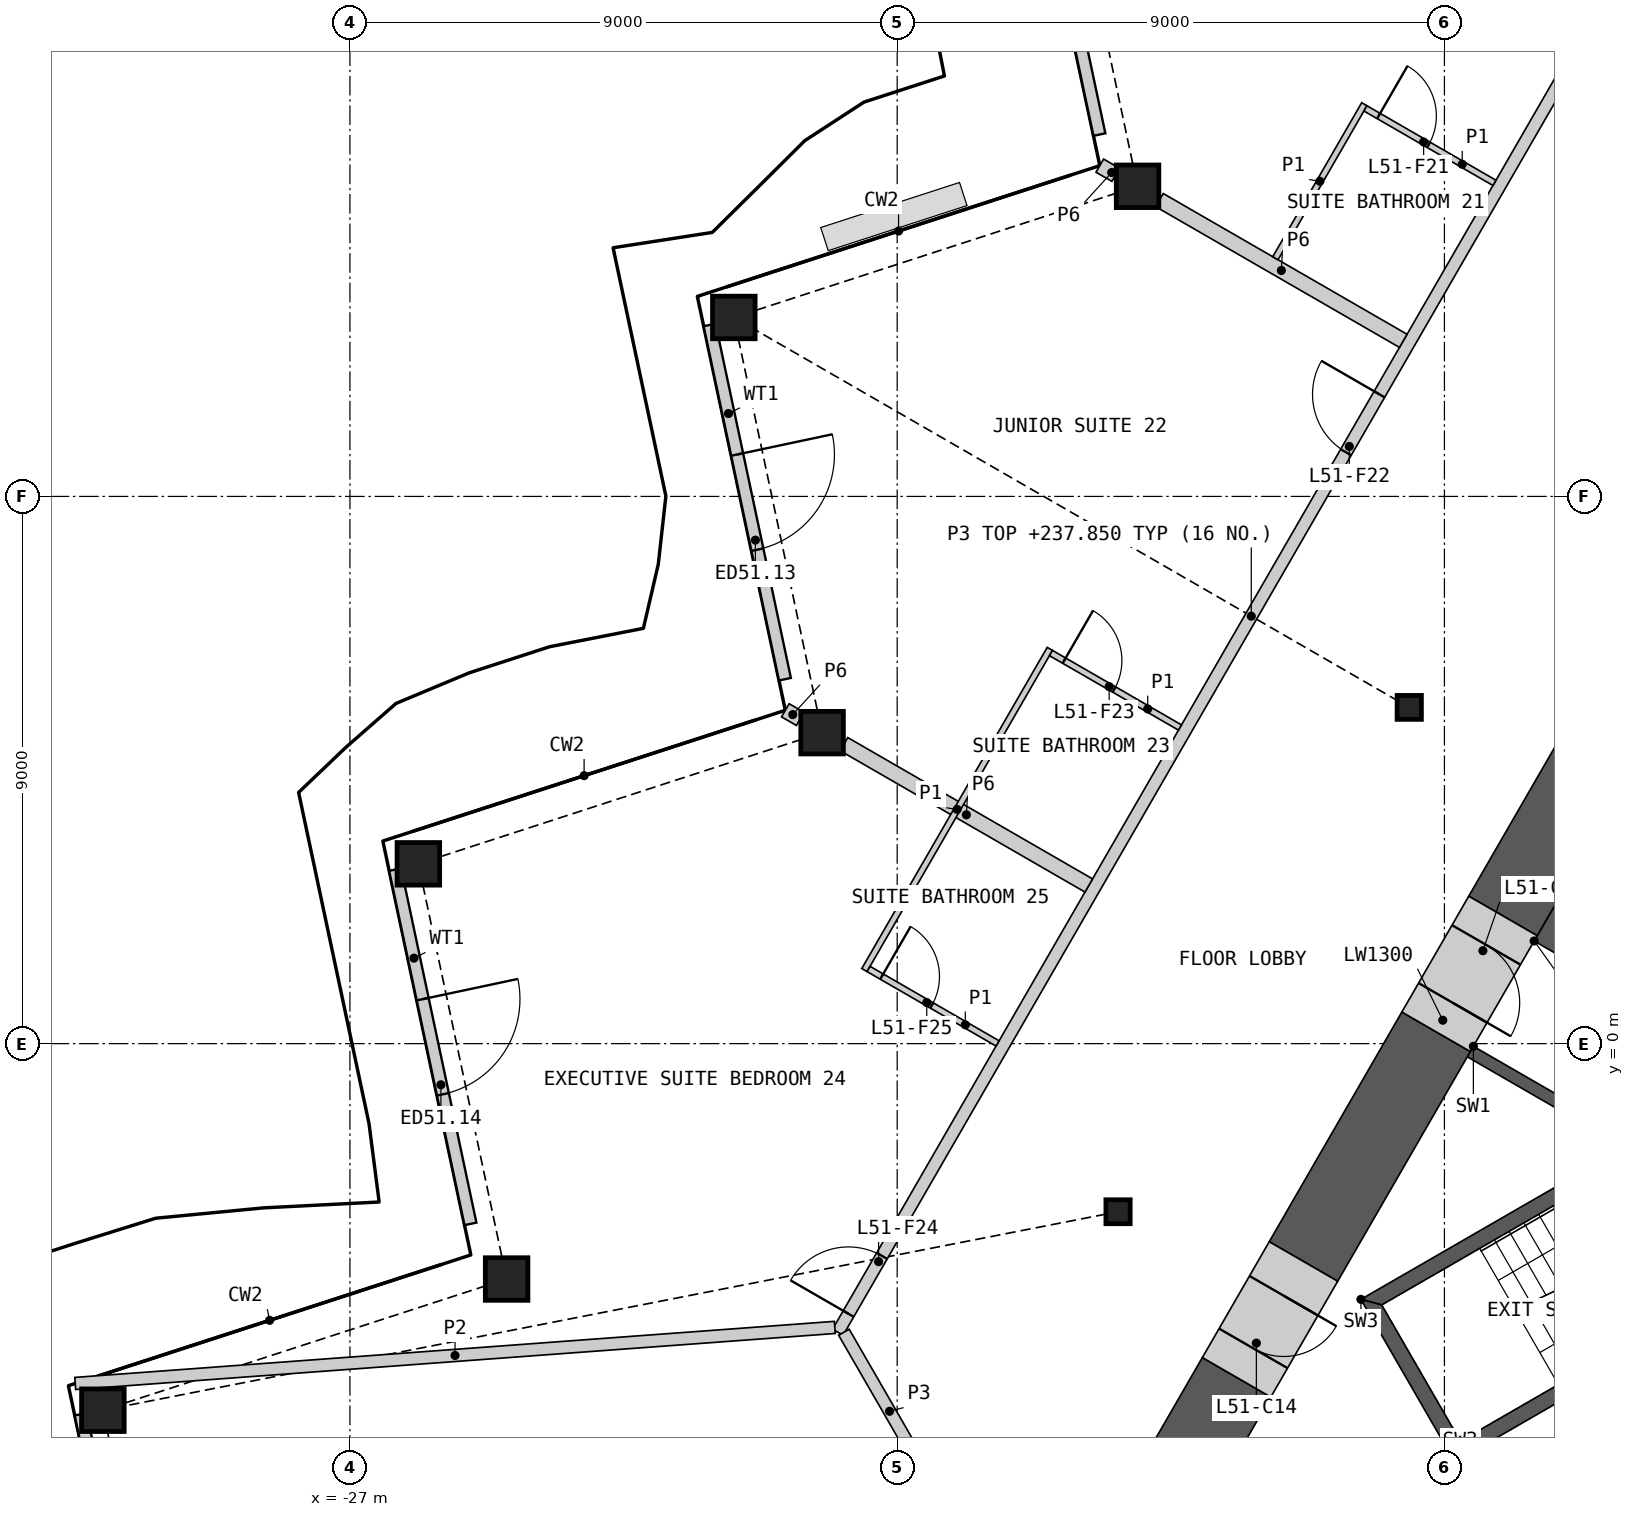
"""IFC4 building model, lengths in metres.
Left out: names, types, materials, properties, quantities, classifications, styles, units other than length and angle.
Written with IfcOpenShell. Run it as: python <this file> out.ifc"""

import sys

from ifc_helpers import new_model, si_unit, direction, frame, frame_2d, origin, origin_2d, place, context, subcontext, project, spatial, polyline, rectangle, hollow_rectangle, i_section, outline, extrude, element, fill, save


model = new_model("IFC4")
c1 = context("Model", 3, precision=1e-05, world=origin(), true_north=direction((0.0, 1.0)))
c2 = subcontext(c1, "Body", "Model", "MODEL_VIEW")
j1 = project(units=[si_unit("LENGTHUNIT", "METRE"), si_unit("PLANEANGLEUNIT", "RADIAN")], contexts=[c1])
p1 = place(None, origin())
s1 = spatial("IfcSite", under=j1, at=p1, CompositionType="ELEMENT")
p2 = place(p1, origin())
s2 = spatial("IfcBuilding", under=s1, at=p2, CompositionType="ELEMENT")
p3 = place(p2, frame((0.0, 0.0, 234.6)))
s3 = spatial("IfcBuildingStorey", under=s2, at=p3, CompositionType="ELEMENT", Elevation=234.6)
for number, where, z_axis, x_axis in (
    (1, (-14.047, 14.101, 0.0), (0.0, 0.0, 1.0), (1.0, 0.0, 0.0)),
    (2, (-20.687, 11.943, 0.0), (0.0, 0.0, 1.0), (1.0, 0.0, 0.0)),
    (3, (-19.235, 5.115, 0.0), (0.0, 0.0, 1.0), (1.0, 0.0, 0.0)),
    (4, (-25.875, 2.957, 0.0), (0.0, 0.0, 1.0), (1.0, 0.0, 0.0)),
    (5, (-24.423, -3.872, 0.0), (0.0, 0.0, 1.0), (1.0, 0.0, 0.0)),
    (6, (-31.063, -6.029, 0.0), (0.0, 0.0, 1.0), (1.0, 0.0, 0.0)),
):
    element("IfcColumn", number, at=place(p3, frame(where, z_axis=z_axis, x_axis=x_axis)), inside=s3, PredefinedType="COLUMN", context=c2, shape_type="SweptSolid", body=[
        extrude(hollow_rectangle(XDim=0.7, YDim=0.7, WallThickness=0.045, at=origin_2d()), origin(), (0.0, 0.0, 1.0), 3.6),
    ])
for number, where, z_axis, x_axis in (
    (7, (-9.578, 5.53, 0.0), (0.0, 0.0, 1.0), (1.0, 0.0, 0.0)),
    (8, (-14.368, -2.765, 0.0), (0.0, 0.0, 1.0), (1.0, 0.0, 0.0)),
):
    element("IfcColumn", number, at=place(p3, frame(where, z_axis=z_axis, x_axis=x_axis)), inside=s3, PredefinedType="COLUMN", context=c2, shape_type="SweptSolid", body=[
        extrude(i_section(OverallWidth=0.399, OverallDepth=0.393, WebThickness=0.023, FlangeThickness=0.037, at=origin_2d()), origin(), (0.0, 0.0, 1.0), 3.6),
    ])
p4 = place(p3, frame((-15.913, 20.779, 0.0), z_axis=(0.0, 0.0, 1.0), x_axis=(0.207930802022, -0.978143538327, 0.0)))
e9 = element("IfcWall", 9, at=p4, inside=s3, PredefinedType="SOLIDWALL", context=c2, shape_type="SweptSolid", body=[
    extrude(rectangle(XDim=5.958, YDim=0.2, at=frame_2d((2.979, 0.0))), origin(), (0.0, 0.0, 1.0), 2.701),
])
p5 = place(p4, frame((2.179, 0.0, 0.0)))
e10 = element("IfcOpeningElement", 10, at=p5, cuts=e9, PredefinedType="OPENING", context=c2, shape_type="SweptSolid", body=[
    extrude(rectangle(XDim=1.6, YDim=2.4, at=frame_2d((0.8, 1.2))), frame((0.0, 0.11, 0.0), z_axis=(0.0, -1.0, 0.0), x_axis=(1.0, 0.0, 0.0)), (0.0, 0.0, 1.0), 0.22),
])
p6 = place(p3, frame((-21.085, 11.821, 0.0), z_axis=(0.0, 0.0, 1.0), x_axis=(0.207930802022, -0.978143538327, 0.0)))
e11 = element("IfcWall", 11, at=p6, inside=s3, PredefinedType="SOLIDWALL", context=c2, shape_type="SweptSolid", body=[
    extrude(rectangle(XDim=5.958, YDim=0.2, at=frame_2d((2.979, 0.0))), origin(), (0.0, 0.0, 1.0), 2.701),
])
p7 = place(p6, frame((2.179, 0.0, 0.0)))
e12 = element("IfcOpeningElement", 12, at=p7, cuts=e11, PredefinedType="OPENING", context=c2, shape_type="SweptSolid", body=[
    extrude(rectangle(XDim=1.6, YDim=2.4, at=frame_2d((0.8, 1.2))), frame((0.0, 0.11, 0.0), z_axis=(0.0, -1.0, 0.0), x_axis=(1.0, 0.0, 0.0)), (0.0, 0.0, 1.0), 0.22),
])
p8 = place(p3, frame((-26.257, 2.863, 0.0), z_axis=(0.0, 0.0, 1.0), x_axis=(0.207930802022, -0.978143538327, 0.0)))
e13 = element("IfcWall", 13, at=p8, inside=s3, PredefinedType="SOLIDWALL", context=c2, shape_type="SweptSolid", body=[
    extrude(rectangle(XDim=5.958, YDim=0.2, at=frame_2d((2.979, 0.0))), origin(), (0.0, 0.0, 1.0), 2.701),
])
p9 = place(p8, frame((2.179, 0.0, 0.0)))
e14 = element("IfcOpeningElement", 14, at=p9, cuts=e13, PredefinedType="OPENING", context=c2, shape_type="SweptSolid", body=[
    extrude(rectangle(XDim=1.6, YDim=2.4, at=frame_2d((0.8, 1.2))), frame((0.0, 0.11, 0.0), z_axis=(0.0, -1.0, 0.0), x_axis=(1.0, 0.0, 0.0)), (0.0, 0.0, 1.0), 0.22),
])
p10 = place(p3, frame((-31.428, -6.095, 0.0), z_axis=(0.0, 0.0, 1.0), x_axis=(0.207939137045, -0.978141766456, 0.0)))
e15 = element("IfcWall", 15, at=p10, inside=s3, PredefinedType="SOLIDWALL", context=c2, shape_type="SweptSolid", body=[
    extrude(rectangle(XDim=5.957, YDim=0.2, at=frame_2d((2.979, 0.0))), origin(), (0.0, 0.0, 1.0), 2.701),
])
p11 = place(p10, frame((2.179, 0.0, 0.0)))
e16 = element("IfcOpeningElement", 16, at=p11, cuts=e15, PredefinedType="OPENING", context=c2, shape_type="SweptSolid", body=[
    extrude(rectangle(XDim=1.6, YDim=2.4, at=frame_2d((0.8, 1.2))), frame((0.0, 0.11, 0.0), z_axis=(0.0, -1.0, 0.0), x_axis=(1.0, 0.0, 0.0)), (0.0, 0.0, 1.0), 0.22),
])
p12 = place(p3, origin())
e17 = element("IfcWall", 17, at=p12, inside=s3, PredefinedType="SHEAR", context=c2, shape_type="SweptSolid", body=[
    extrude(outline(polyline([(-7.524, 1.688), (-4.124, 7.577), (-3.731, 7.35), (-1.561, 6.097), (-1.66, 5.924), (-3.652, 7.074), (-4.652, 5.342), (-2.66, 4.192), (-2.76, 4.019), (-4.752, 5.169), (-5.752, 3.437), (-3.76, 2.287), (-3.861, 2.113), (-5.852, 3.263), (-6.852, 1.531), (-4.861, 0.381), (-4.96, 0.208), (-7.131, 1.461), (-7.524, 1.688)])), origin(), (0.0, 0.0, 1.0), 3.25),
])
p13 = place(p3, origin())
e18 = element("IfcWall", 18, at=p13, inside=s3, PredefinedType="SHEAR", context=c2, shape_type="SweptSolid", body=[
    extrude(outline(polyline([(-8.524, -0.044), (-8.131, -0.271), (-5.96, -1.524), (-6.061, -1.697), (-8.231, -0.444), (-8.624, -0.217), (-8.524, -0.044)])), origin(), (0.0, 0.0, 1.0), 3.25),
])
p14 = place(p3, origin())
e19 = element("IfcWall", 19, at=p14, inside=s3, PredefinedType="SHEAR", context=c2, shape_type="SweptSolid", body=[
    extrude(outline(polyline([(-5.307, -1.281), (-10.374, -4.206), (-10.032, -4.298), (-5.182, -1.498), (-5.307, -1.281)])), origin(), (0.0, 0.0, 1.0), 3.25),
])
p15 = place(p3, origin())
e20 = element("IfcWall", 20, at=p15, inside=s3, PredefinedType="SHEAR", context=c2, shape_type="SweptSolid", body=[
    extrude(outline(polyline([(-10.374, -4.206), (-8.83, -6.881), (-8.738, -6.539), (-10.032, -4.298), (-10.374, -4.206)])), origin(), (0.0, 0.0, 1.0), 3.25),
])
p16 = place(p3, origin())
e21 = element("IfcWall", 21, at=p16, inside=s3, PredefinedType="SHEAR", context=c2, shape_type="SweptSolid", body=[
    extrude(outline(polyline([(-8.738, -6.539), (-8.83, -6.881), (-3.763, -3.956), (-3.888, -3.739), (-8.738, -6.539)])), origin(), (0.0, 0.0, 1.0), 3.25),
])
p17 = place(p3, frame((-4.636, 7.99, 0.0), z_axis=(0.0, 0.0, 1.0), x_axis=(-0.500022813292, -0.866012232124, 0.0)))
e22 = element("IfcWall", 22, at=p17, inside=s3, PredefinedType="SHEAR", context=c2, shape_type="SweptSolid", body=[
    extrude(rectangle(XDim=6.802, YDim=1.3, at=frame_2d((3.401, 0.0))), origin(), (0.0, 0.0, 1.0), 3.25),
])
p18 = place(p3, frame((-9.137, 0.195, 0.0), z_axis=(0.0, 0.0, 1.0), x_axis=(-0.499985697398, -0.866033661238, 0.0)))
e23 = element("IfcWall", 23, at=p18, inside=s3, PredefinedType="SHEAR", context=c2, shape_type="SweptSolid", body=[
    extrude(rectangle(XDim=4.362, YDim=1.3, at=frame_2d((2.181, 0.0))), origin(), (0.0, 0.0, 1.0), 3.25),
])
p19 = place(p3, frame((-12.418, -5.488, 0.0), z_axis=(0.0, 0.0, 1.0), x_axis=(-0.499931460552, -0.866064971437, 0.0)))
e24 = element("IfcWall", 24, at=p19, inside=s3, PredefinedType="SHEAR", context=c2, shape_type="SweptSolid", body=[
    extrude(rectangle(XDim=1.786, YDim=1.3, at=frame_2d((0.893, 0.0))), origin(), (0.0, 0.0, 1.0), 3.25),
])
p20 = place(p3, frame((-11.318, -3.583, 0.0), z_axis=(0.0, 0.0, 1.0), x_axis=(-0.50002983664, -0.866008176907, 0.0)))
e25 = element("IfcWall", 25, at=p20, inside=s3, PredefinedType="SHEAR", context=c2, shape_type="SweptSolid", body=[
    extrude(rectangle(XDim=2.2, YDim=1.3, at=frame_2d((1.1, 0.0))), origin(), (0.0, 0.0, 1.0), 3.25),
])
p21 = place(p20, frame((0.65, 0.0, 0.0)))
e26 = element("IfcOpeningElement", 26, at=p21, cuts=e25, PredefinedType="OPENING", context=c2, shape_type="SweptSolid", body=[
    extrude(rectangle(XDim=1.0, YDim=2.1, at=frame_2d((0.5, 1.05))), frame((0.0, 0.66, 0.0), z_axis=(0.0, -1.0, 0.0), x_axis=(1.0, 0.0, 0.0)), (0.0, 0.0, 1.0), 1.32),
])
p22 = place(p3, frame((-8.037, 2.1, 0.0), z_axis=(0.0, 0.0, 1.0), x_axis=(-0.50002983664, -0.866008176907, 0.0)))
e27 = element("IfcWall", 27, at=p22, inside=s3, PredefinedType="SHEAR", context=c2, shape_type="SweptSolid", body=[
    extrude(rectangle(XDim=2.2, YDim=1.3, at=frame_2d((1.1, 0.0))), origin(), (0.0, 0.0, 1.0), 3.25),
])
p23 = place(p22, frame((0.55, 0.0, 0.0)))
e28 = element("IfcOpeningElement", 28, at=p23, cuts=e27, PredefinedType="OPENING", context=c2, shape_type="SweptSolid", body=[
    extrude(rectangle(XDim=1.1, YDim=2.1, at=frame_2d((0.55, 1.05))), frame((0.0, 0.66, 0.0), z_axis=(0.0, -1.0, 0.0), x_axis=(1.0, 0.0, 0.0)), (0.0, 0.0, 1.0), 1.32),
])
p24 = place(p3, frame((-18.976, -4.747, 0.0), z_axis=(0.0, 0.0, 1.0), x_axis=(0.499999852422, 0.866025488988, 0.0)))
e29 = element("IfcWall", 29, at=p24, inside=s3, PredefinedType="PARTITIONING", context=c2, shape_type="SweptSolid", body=[
    extrude(rectangle(XDim=27.198, YDim=0.2, at=frame_2d((13.599, 0.0))), origin(), (0.0, 0.0, 1.0), 3.25),
])
p25 = place(p24, frame((25.346, 0.0, 0.0)))
e30 = element("IfcOpeningElement", 30, at=p25, cuts=e29, PredefinedType="OPENING", context=c2, shape_type="SweptSolid", body=[
    extrude(rectangle(XDim=1.1, YDim=2.1, at=frame_2d((0.55, 1.05))), frame((0.0, 0.11, 0.0), z_axis=(0.0, -1.0, 0.0), x_axis=(1.0, 0.0, 0.0)), (0.0, 0.0, 1.0), 0.22),
])
p26 = place(p24, frame((16.713, 0.0, 0.0)))
e31 = element("IfcOpeningElement", 31, at=p26, cuts=e29, PredefinedType="OPENING", context=c2, shape_type="SweptSolid", body=[
    extrude(rectangle(XDim=1.1, YDim=2.1, at=frame_2d((0.55, 1.05))), frame((0.0, 0.11, 0.0), z_axis=(0.0, -1.0, 0.0), x_axis=(1.0, 0.0, 0.0)), (0.0, 0.0, 1.0), 0.22),
])
p27 = place(p24, frame((0.35, 0.0, 0.0)))
e32 = element("IfcOpeningElement", 32, at=p27, cuts=e29, PredefinedType="OPENING", context=c2, shape_type="SweptSolid", body=[
    extrude(rectangle(XDim=1.1, YDim=2.1, at=frame_2d((0.55, 1.05))), frame((0.0, 0.11, 0.0), z_axis=(0.0, -1.0, 0.0), x_axis=(1.0, 0.0, 0.0)), (0.0, 0.0, 1.0), 0.22),
])
p28 = place(p3, frame((-18.875, 4.926, 0.0), z_axis=(0.0, 0.0, 1.0), x_axis=(0.866014168242, -0.500019460026, 0.0)))
e33 = element("IfcWall", 33, at=p28, inside=s3, PredefinedType="PARTITIONING", context=c2, shape_type="SweptSolid", body=[
    extrude(rectangle(XDim=4.649, YDim=0.25, at=frame_2d((2.324, 0.0))), origin(), (0.0, 0.0, 1.0), 2.404),
])
p29 = place(p3, frame((-13.687, 13.874, 0.0), z_axis=(0.0, 0.0, 1.0), x_axis=(0.866034555462, -0.499984148495, 0.0)))
e34 = element("IfcWall", 34, at=p29, inside=s3, PredefinedType="PARTITIONING", context=c2, shape_type="SweptSolid", body=[
    extrude(rectangle(XDim=4.63, YDim=0.25, at=frame_2d((2.315, 0.0))), origin(), (0.0, 0.0, 1.0), 2.404),
])
p30 = place(p3, frame((-18.876, -4.747, 0.0), z_axis=(0.0, 0.0, 1.0), x_axis=(0.499952404951, -0.866052881055, 0.0)))
e35 = element("IfcWall", 35, at=p30, inside=s3, PredefinedType="PARTITIONING", context=c2, shape_type="SweptSolid", body=[
    extrude(rectangle(XDim=3.002, YDim=0.2, at=frame_2d((1.501, 0.0))), origin(), (0.0, 0.0, 1.0), 3.25),
])
p31 = place(p3, frame((-14.668, 14.44, 0.0), z_axis=(0.0, 0.0, 1.0), x_axis=(0.865888485494, -0.500237074485, 0.0)))
e36 = element("IfcWall", 36, at=p31, inside=s3, PredefinedType="PARTITIONING", context=c2, shape_type="SweptSolid", body=[
    extrude(rectangle(XDim=0.301, YDim=0.25, at=frame_2d((0.15, 0.0))), origin(), (0.0, 0.0, 1.0), 2.404),
])
p32 = place(p3, frame((-19.84, 5.482, 0.0), z_axis=(0.0, 0.0, 1.0), x_axis=(0.865998287773, -0.500046963369, 0.0)))
e37 = element("IfcWall", 37, at=p32, inside=s3, PredefinedType="PARTITIONING", context=c2, shape_type="SweptSolid", body=[
    extrude(rectangle(XDim=0.282, YDim=0.25, at=frame_2d((0.141, 0.0))), origin(), (0.0, 0.0, 1.0), 2.404),
])
p33 = place(p3, frame((-31.518, -5.59, 0.0), z_axis=(0.0, 0.0, 1.0), x_axis=(0.99728681237, 0.073613951618, 0.0)))
e38 = element("IfcWall", 38, at=p33, inside=s3, PredefinedType="PARTITIONING", context=c2, shape_type="SweptSolid", body=[
    extrude(rectangle(XDim=12.526, YDim=0.2, at=frame_2d((6.263, 0.0))), origin(), (0.0, 0.0, 1.0), 2.404),
])
p34 = place(p3, frame((-18.539, 1.21, 0.0), z_axis=(0.0, 0.0, 1.0), x_axis=(0.500008851346, 0.866020293397, 0.0)))
e39 = element("IfcWall", 39, at=p34, inside=s3, PredefinedType="PARTITIONING", context=c2, shape_type="SweptSolid", body=[
    extrude(rectangle(XDim=6.1, YDim=0.1, at=frame_2d((3.05, 0.0))), origin(), (0.0, 0.0, 1.0), 2.404),
])
p35 = place(p3, frame((-11.78, 12.917, 0.0), z_axis=(0.0, 0.0, 1.0), x_axis=(0.499999433879, 0.866025730634, 0.0)))
e40 = element("IfcWall", 40, at=p35, inside=s3, PredefinedType="PARTITIONING", context=c2, shape_type="SweptSolid", body=[
    extrude(rectangle(XDim=2.925, YDim=0.1, at=frame_2d((1.462, 0.0))), origin(), (0.0, 0.0, 1.0), 2.404),
])
p36 = place(p3, frame((-15.471, 6.424, 0.0), z_axis=(0.0, 0.0, 1.0), x_axis=(0.866014668023, -0.500018594424, 0.0)))
e41 = element("IfcWall", 41, at=p36, inside=s3, PredefinedType="PARTITIONING", context=c2, shape_type="SweptSolid", body=[
    extrude(rectangle(XDim=2.45, YDim=0.1, at=frame_2d((1.225, 0.0))), origin(), (0.0, 0.0, 1.0), 2.404),
])
p37 = place(p36, frame((0.25, 0.0, 0.0)))
e42 = element("IfcOpeningElement", 42, at=p37, cuts=e41, PredefinedType="OPENING", context=c2, shape_type="SweptSolid", body=[
    extrude(rectangle(XDim=0.95, YDim=2.1, at=frame_2d((0.475, 1.05))), frame((0.0, 0.06, 0.0), z_axis=(0.0, -1.0, 0.0), x_axis=(1.0, 0.0, 0.0)), (0.0, 0.0, 1.0), 0.12),
])
p38 = place(p3, frame((-18.471, 1.228, 0.0), z_axis=(0.0, 0.0, 1.0), x_axis=(0.866057815567, -0.499943856944, 0.0)))
e43 = element("IfcWall", 43, at=p38, inside=s3, PredefinedType="PARTITIONING", context=c2, shape_type="SweptSolid", body=[
    extrude(rectangle(XDim=2.45, YDim=0.1, at=frame_2d((1.225, 0.0))), origin(), (0.0, 0.0, 1.0), 2.404),
])
p39 = place(p38, frame((0.25, 0.0, 0.0)))
e44 = element("IfcOpeningElement", 44, at=p39, cuts=e43, PredefinedType="OPENING", context=c2, shape_type="SweptSolid", body=[
    extrude(rectangle(XDim=0.95, YDim=2.1, at=frame_2d((0.475, 1.05))), frame((0.0, 0.06, 0.0), z_axis=(0.0, -1.0, 0.0), x_axis=(1.0, 0.0, 0.0)), (0.0, 0.0, 1.0), 0.12),
])
p40 = place(p3, frame((-10.299, 15.382, 0.0), z_axis=(0.0, 0.0, 1.0), x_axis=(0.866057815567, -0.499943856944, 0.0)))
e45 = element("IfcWall", 45, at=p40, inside=s3, PredefinedType="PARTITIONING", context=c2, shape_type="SweptSolid", body=[
    extrude(rectangle(XDim=2.45, YDim=0.1, at=frame_2d((1.225, 0.0))), origin(), (0.0, 0.0, 1.0), 2.404),
])
p41 = place(p40, frame((0.25, 0.0, 0.0)))
e46 = element("IfcOpeningElement", 46, at=p41, cuts=e45, PredefinedType="OPENING", context=c2, shape_type="SweptSolid", body=[
    extrude(rectangle(XDim=0.95, YDim=2.1, at=frame_2d((0.475, 1.05))), frame((0.0, 0.06, 0.0), z_axis=(0.0, -1.0, 0.0), x_axis=(1.0, 0.0, 0.0)), (0.0, 0.0, 1.0), 0.12),
])
p42 = place(p7, origin())
e47 = element("IfcDoor", 47, at=p42, inside=s3, OperationType="DOUBLE_DOOR_SINGLE_SWING", PredefinedType="DOOR", context=c2, shape_type="SweptSolid", body=[
    extrude(rectangle(XDim=1.6, YDim=2.4, at=frame_2d((0.8, 1.2))), frame((0.0, 0.025, 0.0), z_axis=(0.0, -1.0, 0.0), x_axis=(1.0, 0.0, 0.0)), (0.0, 0.0, 1.0), 0.05),
])
fill(e12, e47)
p43 = place(p9, origin())
e48 = element("IfcDoor", 48, at=p43, inside=s3, OperationType="DOUBLE_DOOR_SINGLE_SWING", PredefinedType="DOOR", context=c2, shape_type="SweptSolid", body=[
    extrude(rectangle(XDim=1.6, YDim=2.4, at=frame_2d((0.8, 1.2))), frame((0.0, 0.025, 0.0), z_axis=(0.0, -1.0, 0.0), x_axis=(1.0, 0.0, 0.0)), (0.0, 0.0, 1.0), 0.05),
])
fill(e14, e48)
p44 = place(p21, origin())
e49 = element("IfcDoor", 49, at=p44, inside=s3, OperationType="SINGLE_SWING_LEFT", PredefinedType="DOOR", context=c2, shape_type="SweptSolid", body=[
    extrude(rectangle(XDim=1.0, YDim=2.1, at=frame_2d((0.5, 1.05))), frame((0.0, 0.405, 0.0), z_axis=(0.0, -1.0, 0.0), x_axis=(1.0, 0.0, 0.0)), (0.0, 0.0, 1.0), 0.05),
])
fill(e26, e49)
p45 = place(p23, origin())
e50 = element("IfcDoor", 50, at=p45, inside=s3, OperationType="SINGLE_SWING_RIGHT", PredefinedType="DOOR", context=c2, shape_type="SweptSolid", body=[
    extrude(rectangle(XDim=1.1, YDim=2.1, at=frame_2d((0.55, 1.05))), frame((0.0, 0.405, 0.0), z_axis=(0.0, -1.0, 0.0), x_axis=(1.0, 0.0, 0.0)), (0.0, 0.0, 1.0), 0.05),
])
fill(e28, e50)
p46 = place(p41, origin())
e51 = element("IfcDoor", 51, at=p46, inside=s3, OperationType="SINGLE_SWING_LEFT", PredefinedType="DOOR", context=c2, shape_type="SweptSolid", body=[
    extrude(rectangle(XDim=0.95, YDim=2.1, at=frame_2d((0.475, 1.05))), frame((0.0, 0.025, 0.0), z_axis=(0.0, -1.0, 0.0), x_axis=(1.0, 0.0, 0.0)), (0.0, 0.0, 1.0), 0.05),
])
fill(e46, e51)
p47 = place(p26, origin())
e52 = element("IfcDoor", 52, at=p47, inside=s3, OperationType="SINGLE_SWING_RIGHT", PredefinedType="DOOR", context=c2, shape_type="SweptSolid", body=[
    extrude(rectangle(XDim=1.1, YDim=2.1, at=frame_2d((0.55, 1.05))), frame((0.0, 0.025, 0.0), z_axis=(0.0, -1.0, 0.0), x_axis=(1.0, 0.0, 0.0)), (0.0, 0.0, 1.0), 0.05),
])
fill(e31, e52)
p48 = place(p37, origin())
e53 = element("IfcDoor", 53, at=p48, inside=s3, OperationType="SINGLE_SWING_LEFT", PredefinedType="DOOR", context=c2, shape_type="SweptSolid", body=[
    extrude(rectangle(XDim=0.95, YDim=2.1, at=frame_2d((0.475, 1.05))), frame((0.0, 0.025, 0.0), z_axis=(0.0, -1.0, 0.0), x_axis=(1.0, 0.0, 0.0)), (0.0, 0.0, 1.0), 0.05),
])
fill(e42, e53)
p49 = place(p27, origin())
e54 = element("IfcDoor", 54, at=p49, inside=s3, OperationType="SINGLE_SWING_LEFT", PredefinedType="DOOR", context=c2, shape_type="SweptSolid", body=[
    extrude(rectangle(XDim=1.1, YDim=2.1, at=frame_2d((0.55, 1.05))), frame((0.0, 0.025, 0.0), z_axis=(0.0, -1.0, 0.0), x_axis=(1.0, 0.0, 0.0)), (0.0, 0.0, 1.0), 0.05),
])
fill(e32, e54)
p50 = place(p39, origin())
e55 = element("IfcDoor", 55, at=p50, inside=s3, OperationType="SINGLE_SWING_LEFT", PredefinedType="DOOR", context=c2, shape_type="SweptSolid", body=[
    extrude(rectangle(XDim=0.95, YDim=2.1, at=frame_2d((0.475, 1.05))), frame((0.0, 0.025, 0.0), z_axis=(0.0, -1.0, 0.0), x_axis=(1.0, 0.0, 0.0)), (0.0, 0.0, 1.0), 0.05),
])
fill(e44, e55)
save(model, sys.argv[1])
